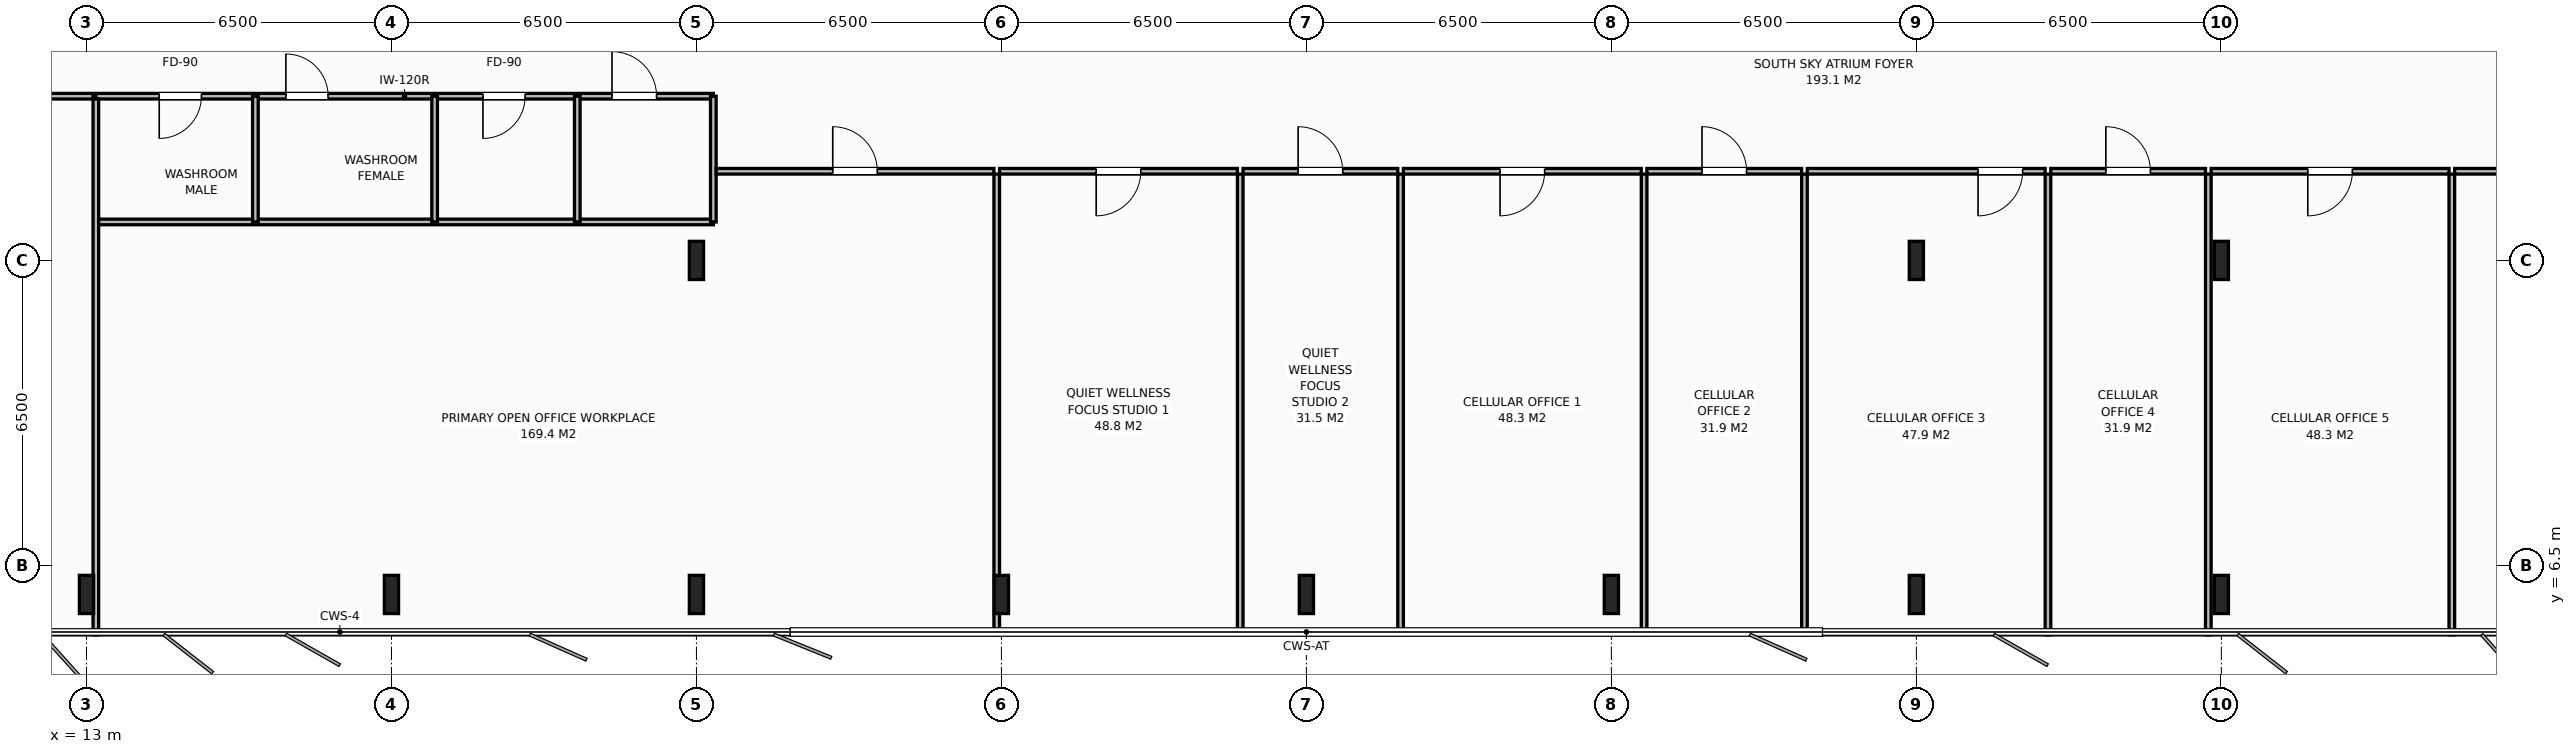
"""IFC4 building model, lengths in metres.
Left out: names, types, materials, properties, quantities, classifications, styles, units other than length and angle.
Written with IfcOpenShell. Run it as: python <this file> out.ifc"""

import sys

from ifc_helpers import new_model, si_unit, direction, frame, frame_2d, origin, origin_2d, place, context, subcontext, project, spatial, rectangle, i_section, extrude, element, fill, save


model = new_model("IFC4")
c1 = context("Model", 3, precision=1e-05, world=origin(), true_north=direction((0.0, 1.0)))
c2 = subcontext(c1, "Body", "Model", "MODEL_VIEW")
j1 = project(units=[si_unit("LENGTHUNIT", "METRE"), si_unit("PLANEANGLEUNIT", "RADIAN")], contexts=[c1])
p1 = place(None, origin())
s1 = spatial("IfcSite", under=j1, at=p1, CompositionType="ELEMENT")
p2 = place(p1, origin())
s2 = spatial("IfcBuilding", under=s1, at=p2, CompositionType="ELEMENT")
p3 = place(p2, frame((0.0, 0.0, 236.6)))
s3 = spatial("IfcBuildingStorey", under=s2, at=p3, CompositionType="ELEMENT", Elevation=236.6)
for number, where, z_axis, x_axis in (
    (1, (58.5, 13.0, 0.0), (0.0, 0.0, 1.0), (1.0, 0.0, 0.0)),
    (2, (26.0, 13.0, 0.0), (0.0, 0.0, 1.0), (1.0, 0.0, 0.0)),
    (3, (52.0, 13.0, 0.0), (0.0, 0.0, 1.0), (1.0, 0.0, 0.0)),
    (4, (13.0, 5.88, 0.0), (0.0, 0.0, 1.0), (1.0, 0.0, 0.0)),
    (5, (19.5, 5.88, 0.0), (0.0, 0.0, 1.0), (1.0, 0.0, 0.0)),
    (6, (26.0, 5.88, 0.0), (0.0, 0.0, 1.0), (1.0, 0.0, 0.0)),
    (7, (32.5, 5.88, 0.0), (0.0, 0.0, 1.0), (1.0, 0.0, 0.0)),
    (8, (39.0, 5.88, 0.0), (0.0, 0.0, 1.0), (1.0, 0.0, 0.0)),
    (9, (45.5, 5.88, 0.0), (0.0, 0.0, 1.0), (1.0, 0.0, 0.0)),
    (10, (52.0, 5.88, 0.0), (0.0, 0.0, 1.0), (1.0, 0.0, 0.0)),
    (11, (58.5, 5.88, 0.0), (0.0, 0.0, 1.0), (1.0, 0.0, 0.0)),
):
    element("IfcColumn", number, at=place(p3, frame(where, z_axis=z_axis, x_axis=x_axis)), inside=s3, PredefinedType="COLUMN", context=c2, shape_type="SweptSolid", body=[
        extrude(i_section(OverallWidth=0.303, OverallDepth=0.814, WebThickness=0.021, FlangeThickness=0.04, at=origin_2d()), origin(), (0.0, 0.0, 1.0), 3.8),
    ])
p4 = place(p3, frame((13.2, 16.5, 0.0), z_axis=(0.0, 0.0, 1.0), x_axis=(1.0, 0.0, 0.0)))
e12 = element("IfcWall", 12, at=p4, inside=s3, PredefinedType="PARTITIONING", context=c2, shape_type="SweptSolid", body=[
    extrude(rectangle(XDim=13.16, YDim=0.12, at=frame_2d((6.58, 0.0))), origin(), (0.0, 0.0, 1.0), 3.58),
])
p5 = place(p4, frame((1.35, 0.0, 0.0)))
e13 = element("IfcOpeningElement", 13, at=p5, cuts=e12, PredefinedType="OPENING", context=c2, shape_type="SweptSolid", body=[
    extrude(rectangle(XDim=0.9, YDim=2.15, at=frame_2d((0.45, 1.075))), frame((0.0, 0.07, 0.0), z_axis=(0.0, -1.0, 0.0), x_axis=(1.0, 0.0, 0.0)), (0.0, 0.0, 1.0), 0.14),
])
p6 = place(p4, frame((4.05, 0.0, 0.0)))
e14 = element("IfcOpeningElement", 14, at=p6, cuts=e12, PredefinedType="OPENING", context=c2, shape_type="SweptSolid", body=[
    extrude(rectangle(XDim=0.9, YDim=2.15, at=frame_2d((0.45, 1.075))), frame((0.0, 0.07, 0.0), z_axis=(0.0, -1.0, 0.0), x_axis=(1.0, 0.0, 0.0)), (0.0, 0.0, 1.0), 0.14),
])
p7 = place(p4, frame((8.25, 0.0, 0.0)))
e15 = element("IfcOpeningElement", 15, at=p7, cuts=e12, PredefinedType="OPENING", context=c2, shape_type="SweptSolid", body=[
    extrude(rectangle(XDim=0.9, YDim=2.15, at=frame_2d((0.45, 1.075))), frame((0.0, 0.07, 0.0), z_axis=(0.0, -1.0, 0.0), x_axis=(1.0, 0.0, 0.0)), (0.0, 0.0, 1.0), 0.14),
])
p8 = place(p4, frame((11.0, 0.0, 0.0)))
e16 = element("IfcOpeningElement", 16, at=p8, cuts=e12, PredefinedType="OPENING", context=c2, shape_type="SweptSolid", body=[
    extrude(rectangle(XDim=0.95, YDim=2.15, at=frame_2d((0.475, 1.075))), frame((0.0, 0.07, 0.0), z_axis=(0.0, -1.0, 0.0), x_axis=(1.0, 0.0, 0.0)), (0.0, 0.0, 1.0), 0.14),
])
p9 = place(p3, frame((13.2, 13.82, 0.0), z_axis=(0.0, 0.0, 1.0), x_axis=(1.0, 0.0, 0.0)))
e17 = element("IfcWall", 17, at=p9, inside=s3, PredefinedType="PARTITIONING", context=c2, shape_type="SweptSolid", body=[
    extrude(rectangle(XDim=13.16, YDim=0.12, at=frame_2d((6.58, 0.0))), origin(), (0.0, 0.0, 1.0), 3.58),
])
for number, where, z_axis, x_axis in (
    (18, (16.6, 13.82, 0.0), (0.0, 0.0, 1.0), (0.0, 1.0, 0.0)),
    (19, (20.42, 13.82, 0.0), (0.0, 0.0, 1.0), (0.0, 1.0, 0.0)),
    (20, (23.46, 13.82, 0.0), (0.0, 0.0, 1.0), (0.0, 1.0, 0.0)),
    (21, (26.36, 13.82, 0.0), (0.0, 0.0, 1.0), (0.0, 1.0, 0.0)),
):
    element("IfcWall", number, at=place(p3, frame(where, z_axis=z_axis, x_axis=x_axis)), inside=s3, PredefinedType="PARTITIONING", context=c2, shape_type="SweptSolid", body=[
        extrude(rectangle(XDim=2.68, YDim=0.12, at=frame_2d((1.34, 0.0))), origin(), (0.0, 0.0, 1.0), 3.58),
    ])
p10 = place(p3, frame((13.2, 5.02, 0.0), z_axis=(0.0, 0.0, 1.0), x_axis=(0.0, 1.0, 0.0)))
e22 = element("IfcWall", 22, at=p10, inside=s3, PredefinedType="PARTITIONING", context=c2, shape_type="SweptSolid", body=[
    extrude(rectangle(XDim=11.42, YDim=0.12, at=frame_2d((5.71, 0.0))), origin(), (0.0, 0.0, 1.0), 2.88),
])
p11 = place(p3, frame((5.98, 16.5, 0.0), z_axis=(0.0, 0.0, 1.0), x_axis=(1.0, 0.0, 0.0)))
e23 = element("IfcWall", 23, at=p11, inside=s3, PredefinedType="PARTITIONING", context=c2, shape_type="SweptSolid", body=[
    extrude(rectangle(XDim=7.16, YDim=0.12, at=frame_2d((3.58, 0.0))), origin(), (0.0, 0.0, 1.0), 3.58),
])
p12 = place(p11, frame((4.9, 0.0, 0.0)))
e24 = element("IfcOpeningElement", 24, at=p12, cuts=e23, PredefinedType="OPENING", context=c2, shape_type="SweptSolid", body=[
    extrude(rectangle(XDim=0.95, YDim=2.15, at=frame_2d((0.475, 1.075))), frame((0.0, 0.07, 0.0), z_axis=(0.0, -1.0, 0.0), x_axis=(1.0, 0.0, 0.0)), (0.0, 0.0, 1.0), 0.14),
])
p13 = place(p3, frame((32.4, 5.02, 0.0), z_axis=(0.0, 0.0, 1.0), x_axis=(0.0, 1.0, 0.0)))
e25 = element("IfcWall", 25, at=p13, inside=s3, PredefinedType="PARTITIONING", context=c2, shape_type="SweptSolid", body=[
    extrude(rectangle(XDim=9.82, YDim=0.12, at=frame_2d((4.91, 0.0))), origin(), (0.0, 0.0, 1.0), 2.88),
])
p14 = place(p3, frame((26.42, 14.9, 0.0), z_axis=(0.0, 0.0, 1.0), x_axis=(1.0, 0.0, 0.0)))
e26 = element("IfcWall", 26, at=p14, inside=s3, PredefinedType="PARTITIONING", context=c2, shape_type="SweptSolid", body=[
    extrude(rectangle(XDim=5.92, YDim=0.12, at=frame_2d((2.96, 0.0))), origin(), (0.0, 0.0, 1.0), 3.58),
])
p15 = place(p14, frame((2.485, 0.0, 0.0)))
e27 = element("IfcOpeningElement", 27, at=p15, cuts=e26, PredefinedType="OPENING", context=c2, shape_type="SweptSolid", body=[
    extrude(rectangle(XDim=0.95, YDim=2.15, at=frame_2d((0.475, 1.075))), frame((0.0, 0.07, 0.0), z_axis=(0.0, -1.0, 0.0), x_axis=(1.0, 0.0, 0.0)), (0.0, 0.0, 1.0), 0.14),
])
p16 = place(p3, frame((37.59, 5.02, 0.0), z_axis=(0.0, 0.0, 1.0), x_axis=(0.0, 1.0, 0.0)))
e28 = element("IfcWall", 28, at=p16, inside=s3, PredefinedType="PARTITIONING", context=c2, shape_type="SweptSolid", body=[
    extrude(rectangle(XDim=9.82, YDim=0.12, at=frame_2d((4.91, 0.0))), origin(), (0.0, 0.0, 1.0), 3.58),
])
p17 = place(p3, frame((32.46, 14.9, 0.0), z_axis=(0.0, 0.0, 1.0), x_axis=(1.0, 0.0, 0.0)))
e29 = element("IfcWall", 29, at=p17, inside=s3, PredefinedType="PARTITIONING", context=c2, shape_type="SweptSolid", body=[
    extrude(rectangle(XDim=5.07, YDim=0.12, at=frame_2d((2.535, 0.0))), origin(), (0.0, 0.0, 1.0), 3.58),
])
p18 = place(p17, frame((2.06, 0.0, 0.0)))
e30 = element("IfcOpeningElement", 30, at=p18, cuts=e29, PredefinedType="OPENING", context=c2, shape_type="SweptSolid", body=[
    extrude(rectangle(XDim=0.95, YDim=2.15, at=frame_2d((0.475, 1.075))), frame((0.0, 0.07, 0.0), z_axis=(0.0, -1.0, 0.0), x_axis=(1.0, 0.0, 0.0)), (0.0, 0.0, 1.0), 0.14),
])
p19 = place(p3, frame((41.008, 5.02, 0.0), z_axis=(0.0, 0.0, 1.0), x_axis=(0.0, 1.0, 0.0)))
e31 = element("IfcWall", 31, at=p19, inside=s3, PredefinedType="PARTITIONING", context=c2, shape_type="SweptSolid", body=[
    extrude(rectangle(XDim=9.82, YDim=0.12, at=frame_2d((4.91, 0.0))), origin(), (0.0, 0.0, 1.0), 3.58),
])
p20 = place(p3, frame((37.65, 14.9, 0.0), z_axis=(0.0, 0.0, 1.0), x_axis=(1.0, 0.0, 0.0)))
e32 = element("IfcWall", 32, at=p20, inside=s3, PredefinedType="PARTITIONING", context=c2, shape_type="SweptSolid", body=[
    extrude(rectangle(XDim=3.298, YDim=0.12, at=frame_2d((1.649, 0.0))), origin(), (0.0, 0.0, 1.0), 3.58),
])
p21 = place(p20, frame((1.174, 0.0, 0.0)))
e33 = element("IfcOpeningElement", 33, at=p21, cuts=e32, PredefinedType="OPENING", context=c2, shape_type="SweptSolid", body=[
    extrude(rectangle(XDim=0.95, YDim=2.15, at=frame_2d((0.475, 1.075))), frame((0.0, 0.07, 0.0), z_axis=(0.0, -1.0, 0.0), x_axis=(1.0, 0.0, 0.0)), (0.0, 0.0, 1.0), 0.14),
])
p22 = place(p3, frame((46.198, 5.02, 0.0), z_axis=(0.0, 0.0, 1.0), x_axis=(0.0, 1.0, 0.0)))
e34 = element("IfcWall", 34, at=p22, inside=s3, PredefinedType="PARTITIONING", context=c2, shape_type="SweptSolid", body=[
    extrude(rectangle(XDim=9.82, YDim=0.12, at=frame_2d((4.91, 0.0))), origin(), (0.0, 0.0, 1.0), 3.58),
])
p23 = place(p3, frame((41.067, 14.9, 0.0), z_axis=(0.0, 0.0, 1.0), x_axis=(1.0, 0.0, 0.0)))
e35 = element("IfcWall", 35, at=p23, inside=s3, PredefinedType="PARTITIONING", context=c2, shape_type="SweptSolid", body=[
    extrude(rectangle(XDim=5.07, YDim=0.12, at=frame_2d((2.535, 0.0))), origin(), (0.0, 0.0, 1.0), 3.58),
])
p24 = place(p23, frame((2.06, 0.0, 0.0)))
e36 = element("IfcOpeningElement", 36, at=p24, cuts=e35, PredefinedType="OPENING", context=c2, shape_type="SweptSolid", body=[
    extrude(rectangle(XDim=0.95, YDim=2.15, at=frame_2d((0.475, 1.075))), frame((0.0, 0.07, 0.0), z_axis=(0.0, -1.0, 0.0), x_axis=(1.0, 0.0, 0.0)), (0.0, 0.0, 1.0), 0.14),
])
p25 = place(p3, frame((49.615, 5.02, 0.0), z_axis=(0.0, 0.0, 1.0), x_axis=(0.0, 1.0, 0.0)))
e37 = element("IfcWall", 37, at=p25, inside=s3, PredefinedType="PARTITIONING", context=c2, shape_type="SweptSolid", body=[
    extrude(rectangle(XDim=9.82, YDim=0.12, at=frame_2d((4.91, 0.0))), origin(), (0.0, 0.0, 1.0), 3.58),
])
p26 = place(p3, frame((46.257, 14.9, 0.0), z_axis=(0.0, 0.0, 1.0), x_axis=(1.0, 0.0, 0.0)))
e38 = element("IfcWall", 38, at=p26, inside=s3, PredefinedType="PARTITIONING", context=c2, shape_type="SweptSolid", body=[
    extrude(rectangle(XDim=3.298, YDim=0.12, at=frame_2d((1.649, 0.0))), origin(), (0.0, 0.0, 1.0), 3.58),
])
p27 = place(p26, frame((1.174, 0.0, 0.0)))
e39 = element("IfcOpeningElement", 39, at=p27, cuts=e38, PredefinedType="OPENING", context=c2, shape_type="SweptSolid", body=[
    extrude(rectangle(XDim=0.95, YDim=2.15, at=frame_2d((0.475, 1.075))), frame((0.0, 0.07, 0.0), z_axis=(0.0, -1.0, 0.0), x_axis=(1.0, 0.0, 0.0)), (0.0, 0.0, 1.0), 0.14),
])
p28 = place(p3, frame((54.805, 5.02, 0.0), z_axis=(0.0, 0.0, 1.0), x_axis=(0.0, 1.0, 0.0)))
e40 = element("IfcWall", 40, at=p28, inside=s3, PredefinedType="PARTITIONING", context=c2, shape_type="SweptSolid", body=[
    extrude(rectangle(XDim=9.82, YDim=0.12, at=frame_2d((4.91, 0.0))), origin(), (0.0, 0.0, 1.0), 3.58),
])
p29 = place(p3, frame((49.675, 14.9, 0.0), z_axis=(0.0, 0.0, 1.0), x_axis=(1.0, 0.0, 0.0)))
e41 = element("IfcWall", 41, at=p29, inside=s3, PredefinedType="PARTITIONING", context=c2, shape_type="SweptSolid", body=[
    extrude(rectangle(XDim=5.07, YDim=0.12, at=frame_2d((2.535, 0.0))), origin(), (0.0, 0.0, 1.0), 3.58),
])
p30 = place(p29, frame((3.64, 0.0, 0.0)))
e42 = element("IfcOpeningElement", 42, at=p30, cuts=e41, PredefinedType="OPENING", context=c2, shape_type="SweptSolid", body=[
    extrude(rectangle(XDim=0.95, YDim=2.15, at=frame_2d((0.475, 1.075))), frame((0.0, 0.07, 0.0), z_axis=(0.0, -1.0, 0.0), x_axis=(1.0, 0.0, 0.0)), (0.0, 0.0, 1.0), 0.14),
])
p31 = place(p3, frame((58.223, 5.02, 0.0), z_axis=(0.0, 0.0, 1.0), x_axis=(0.0, 1.0, 0.0)))
e43 = element("IfcWall", 43, at=p31, inside=s3, PredefinedType="PARTITIONING", context=c2, shape_type="SweptSolid", body=[
    extrude(rectangle(XDim=9.82, YDim=0.12, at=frame_2d((4.91, 0.0))), origin(), (0.0, 0.0, 1.0), 3.58),
])
p32 = place(p3, frame((54.865, 14.9, 0.0), z_axis=(0.0, 0.0, 1.0), x_axis=(1.0, 0.0, 0.0)))
e44 = element("IfcWall", 44, at=p32, inside=s3, PredefinedType="PARTITIONING", context=c2, shape_type="SweptSolid", body=[
    extrude(rectangle(XDim=3.298, YDim=0.12, at=frame_2d((1.649, 0.0))), origin(), (0.0, 0.0, 1.0), 3.58),
])
p33 = place(p32, frame((1.174, 0.0, 0.0)))
e45 = element("IfcOpeningElement", 45, at=p33, cuts=e44, PredefinedType="OPENING", context=c2, shape_type="SweptSolid", body=[
    extrude(rectangle(XDim=0.95, YDim=2.15, at=frame_2d((0.475, 1.075))), frame((0.0, 0.07, 0.0), z_axis=(0.0, -1.0, 0.0), x_axis=(1.0, 0.0, 0.0)), (0.0, 0.0, 1.0), 0.14),
])
p34 = place(p3, frame((63.413, 5.02, 0.0), z_axis=(0.0, 0.0, 1.0), x_axis=(0.0, 1.0, 0.0)))
e46 = element("IfcWall", 46, at=p34, inside=s3, PredefinedType="PARTITIONING", context=c2, shape_type="SweptSolid", body=[
    extrude(rectangle(XDim=9.82, YDim=0.12, at=frame_2d((4.91, 0.0))), origin(), (0.0, 0.0, 1.0), 3.58),
])
p35 = place(p3, frame((58.283, 14.9, 0.0), z_axis=(0.0, 0.0, 1.0), x_axis=(1.0, 0.0, 0.0)))
e47 = element("IfcWall", 47, at=p35, inside=s3, PredefinedType="PARTITIONING", context=c2, shape_type="SweptSolid", body=[
    extrude(rectangle(XDim=5.07, YDim=0.12, at=frame_2d((2.535, 0.0))), origin(), (0.0, 0.0, 1.0), 3.58),
])
p36 = place(p35, frame((2.06, 0.0, 0.0)))
e48 = element("IfcOpeningElement", 48, at=p36, cuts=e47, PredefinedType="OPENING", context=c2, shape_type="SweptSolid", body=[
    extrude(rectangle(XDim=0.95, YDim=2.15, at=frame_2d((0.475, 1.075))), frame((0.0, 0.07, 0.0), z_axis=(0.0, -1.0, 0.0), x_axis=(1.0, 0.0, 0.0)), (0.0, 0.0, 1.0), 0.14),
])
p37 = place(p3, frame((63.472, 14.9, 0.0), z_axis=(0.0, 0.0, 1.0), x_axis=(1.0, 0.0, 0.0)))
e49 = element("IfcWall", 49, at=p37, inside=s3, PredefinedType="PARTITIONING", context=c2, shape_type="SweptSolid", body=[
    extrude(rectangle(XDim=3.298, YDim=0.12, at=frame_2d((1.649, 0.0))), origin(), (0.0, 0.0, 1.0), 3.58),
])
p38 = place(p37, frame((1.174, 0.0, 0.0)))
e50 = element("IfcOpeningElement", 50, at=p38, cuts=e49, PredefinedType="OPENING", context=c2, shape_type="SweptSolid", body=[
    extrude(rectangle(XDim=0.95, YDim=2.15, at=frame_2d((0.475, 1.075))), frame((0.0, 0.07, 0.0), z_axis=(0.0, -1.0, 0.0), x_axis=(1.0, 0.0, 0.0)), (0.0, 0.0, 1.0), 0.14),
])
p39 = place(p5, origin())
e51 = element("IfcDoor", 51, at=p39, inside=s3, OperationType="SINGLE_SWING_RIGHT", PredefinedType="DOOR", context=c2, shape_type="SweptSolid", body=[
    extrude(rectangle(XDim=0.9, YDim=2.15, at=frame_2d((0.45, 1.075))), frame((0.0, 0.025, 0.0), z_axis=(0.0, -1.0, 0.0), x_axis=(1.0, 0.0, 0.0)), (0.0, 0.0, 1.0), 0.05),
])
fill(e13, e51)
p40 = place(p6, origin())
e52 = element("IfcDoor", 52, at=p40, inside=s3, OperationType="SINGLE_SWING_LEFT", PredefinedType="DOOR", context=c2, shape_type="SweptSolid", body=[
    extrude(rectangle(XDim=0.9, YDim=2.15, at=frame_2d((0.45, 1.075))), frame((0.0, 0.025, 0.0), z_axis=(0.0, -1.0, 0.0), x_axis=(1.0, 0.0, 0.0)), (0.0, 0.0, 1.0), 0.05),
])
fill(e14, e52)
p41 = place(p7, origin())
e53 = element("IfcDoor", 53, at=p41, inside=s3, OperationType="SINGLE_SWING_RIGHT", PredefinedType="DOOR", context=c2, shape_type="SweptSolid", body=[
    extrude(rectangle(XDim=0.9, YDim=2.15, at=frame_2d((0.45, 1.075))), frame((0.0, 0.025, 0.0), z_axis=(0.0, -1.0, 0.0), x_axis=(1.0, 0.0, 0.0)), (0.0, 0.0, 1.0), 0.05),
])
fill(e15, e53)
p42 = place(p8, origin())
e54 = element("IfcDoor", 54, at=p42, inside=s3, OperationType="SINGLE_SWING_LEFT", PredefinedType="DOOR", context=c2, shape_type="SweptSolid", body=[
    extrude(rectangle(XDim=0.95, YDim=2.15, at=frame_2d((0.475, 1.075))), frame((0.0, 0.025, 0.0), z_axis=(0.0, -1.0, 0.0), x_axis=(1.0, 0.0, 0.0)), (0.0, 0.0, 1.0), 0.05),
])
fill(e16, e54)
p43 = place(p15, origin())
e55 = element("IfcDoor", 55, at=p43, inside=s3, OperationType="SINGLE_SWING_LEFT", PredefinedType="DOOR", context=c2, shape_type="SweptSolid", body=[
    extrude(rectangle(XDim=0.95, YDim=2.15, at=frame_2d((0.475, 1.075))), frame((0.0, 0.025, 0.0), z_axis=(0.0, -1.0, 0.0), x_axis=(1.0, 0.0, 0.0)), (0.0, 0.0, 1.0), 0.05),
])
fill(e27, e55)
p44 = place(p18, origin())
e56 = element("IfcDoor", 56, at=p44, inside=s3, OperationType="SINGLE_SWING_RIGHT", PredefinedType="DOOR", context=c2, shape_type="SweptSolid", body=[
    extrude(rectangle(XDim=0.95, YDim=2.15, at=frame_2d((0.475, 1.075))), frame((0.0, 0.025, 0.0), z_axis=(0.0, -1.0, 0.0), x_axis=(1.0, 0.0, 0.0)), (0.0, 0.0, 1.0), 0.05),
])
fill(e30, e56)
p45 = place(p21, origin())
e57 = element("IfcDoor", 57, at=p45, inside=s3, OperationType="SINGLE_SWING_LEFT", PredefinedType="DOOR", context=c2, shape_type="SweptSolid", body=[
    extrude(rectangle(XDim=0.95, YDim=2.15, at=frame_2d((0.475, 1.075))), frame((0.0, 0.025, 0.0), z_axis=(0.0, -1.0, 0.0), x_axis=(1.0, 0.0, 0.0)), (0.0, 0.0, 1.0), 0.05),
])
fill(e33, e57)
p46 = place(p24, origin())
e58 = element("IfcDoor", 58, at=p46, inside=s3, OperationType="SINGLE_SWING_RIGHT", PredefinedType="DOOR", context=c2, shape_type="SweptSolid", body=[
    extrude(rectangle(XDim=0.95, YDim=2.15, at=frame_2d((0.475, 1.075))), frame((0.0, 0.025, 0.0), z_axis=(0.0, -1.0, 0.0), x_axis=(1.0, 0.0, 0.0)), (0.0, 0.0, 1.0), 0.05),
])
fill(e36, e58)
p47 = place(p27, origin())
e59 = element("IfcDoor", 59, at=p47, inside=s3, OperationType="SINGLE_SWING_LEFT", PredefinedType="DOOR", context=c2, shape_type="SweptSolid", body=[
    extrude(rectangle(XDim=0.95, YDim=2.15, at=frame_2d((0.475, 1.075))), frame((0.0, 0.025, 0.0), z_axis=(0.0, -1.0, 0.0), x_axis=(1.0, 0.0, 0.0)), (0.0, 0.0, 1.0), 0.05),
])
fill(e39, e59)
p48 = place(p30, origin())
e60 = element("IfcDoor", 60, at=p48, inside=s3, OperationType="SINGLE_SWING_RIGHT", PredefinedType="DOOR", context=c2, shape_type="SweptSolid", body=[
    extrude(rectangle(XDim=0.95, YDim=2.15, at=frame_2d((0.475, 1.075))), frame((0.0, 0.025, 0.0), z_axis=(0.0, -1.0, 0.0), x_axis=(1.0, 0.0, 0.0)), (0.0, 0.0, 1.0), 0.05),
])
fill(e42, e60)
p49 = place(p33, origin())
e61 = element("IfcDoor", 61, at=p49, inside=s3, OperationType="SINGLE_SWING_LEFT", PredefinedType="DOOR", context=c2, shape_type="SweptSolid", body=[
    extrude(rectangle(XDim=0.95, YDim=2.15, at=frame_2d((0.475, 1.075))), frame((0.0, 0.025, 0.0), z_axis=(0.0, -1.0, 0.0), x_axis=(1.0, 0.0, 0.0)), (0.0, 0.0, 1.0), 0.05),
])
fill(e45, e61)
p50 = place(p36, origin())
e62 = element("IfcDoor", 62, at=p50, inside=s3, OperationType="SINGLE_SWING_RIGHT", PredefinedType="DOOR", context=c2, shape_type="SweptSolid", body=[
    extrude(rectangle(XDim=0.95, YDim=2.15, at=frame_2d((0.475, 1.075))), frame((0.0, 0.025, 0.0), z_axis=(0.0, -1.0, 0.0), x_axis=(1.0, 0.0, 0.0)), (0.0, 0.0, 1.0), 0.05),
])
fill(e48, e62)
save(model, sys.argv[1])
